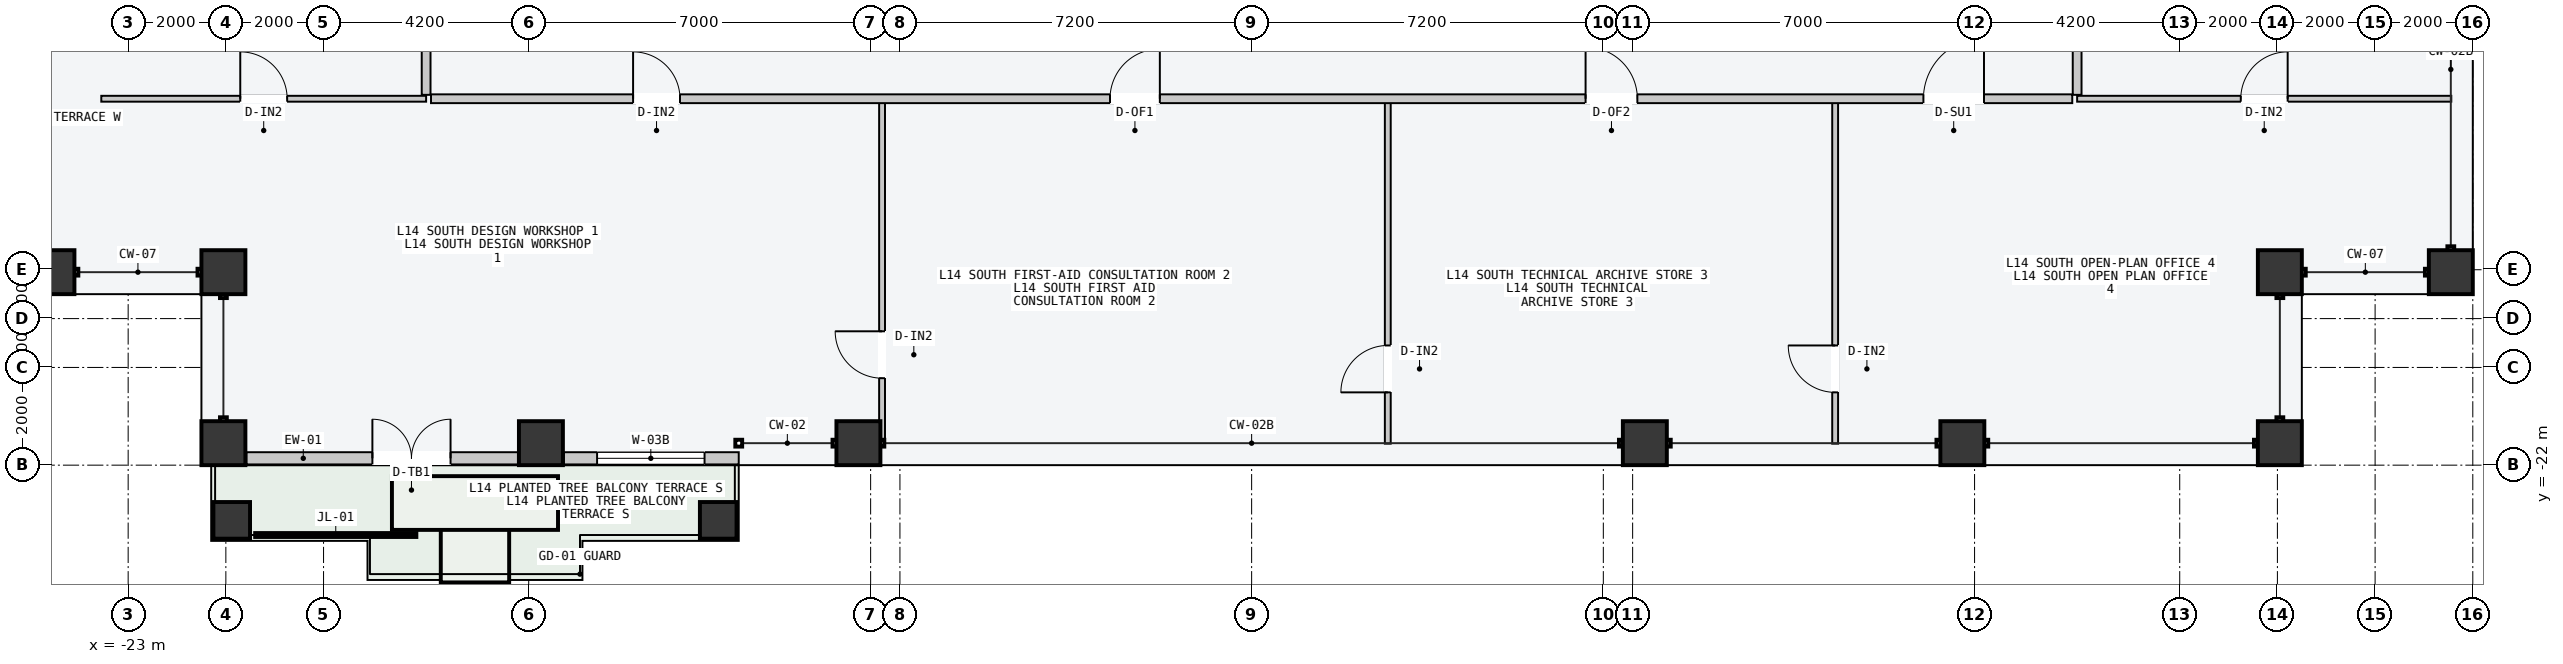
"""IFC4 building model, lengths in metres.
Left out: names, types, materials, properties, quantities, classifications, styles, units other than length and angle.
Written with IfcOpenShell. Run it as: python <this file> out.ifc"""

import sys

from ifc_helpers import new_model, si_unit, direction, frame, frame_2d, origin, origin_2d, place, context, subcontext, project, spatial, rectangle, hollow_rectangle, extrude, element, fill, save


model = new_model("IFC4")
c1 = context("Model", 3, precision=1e-05, world=origin(), true_north=direction((0.0, 1.0)))
c2 = subcontext(c1, "Body", "Model", "MODEL_VIEW")
j1 = project(units=[si_unit("LENGTHUNIT", "METRE"), si_unit("PLANEANGLEUNIT", "RADIAN")], contexts=[c1])
p1 = place(None, origin())
s1 = spatial("IfcSite", under=j1, at=p1, CompositionType="ELEMENT")
p2 = place(p1, origin())
s2 = spatial("IfcBuilding", under=s1, at=p2, CompositionType="ELEMENT")
p3 = place(p2, frame((0.0, 0.0, 56.4)))
s3 = spatial("IfcBuildingStorey", under=s2, at=p3, CompositionType="ELEMENT", Elevation=56.4)
for number, where, z_axis, x_axis in (
    (1, (-21.05, -21.55, 0.0), (0.0, 0.0, 1.0), (1.0, 0.0, 0.0)),
    (2, (-14.55, -21.55, 0.0), (0.0, 0.0, 1.0), (1.0, 0.0, 0.0)),
    (3, (-8.05, -21.55, 0.0), (0.0, 0.0, 1.0), (1.0, 0.0, 0.0)),
    (4, (8.05, -21.55, 0.0), (0.0, 0.0, 1.0), (1.0, 0.0, 0.0)),
    (5, (14.55, -21.55, 0.0), (0.0, 0.0, 1.0), (1.0, 0.0, 0.0)),
    (6, (21.05, -21.55, 0.0), (0.0, 0.0, 1.0), (1.0, 0.0, 0.0)),
    (7, (-24.55, -18.05, 0.0), (0.0, 0.0, 1.0), (0.0, 1.0, 0.0)),
    (8, (24.55, -18.05, 0.0), (0.0, 0.0, 1.0), (0.0, 1.0, 0.0)),
    (9, (21.05, -18.05, 0.0), (0.0, 0.0, 1.0), (1.0, 0.0, 0.0)),
    (10, (-21.05, -18.05, 0.0), (0.0, 0.0, 1.0), (1.0, 0.0, 0.0)),
):
    element("IfcColumn", number, at=place(p3, frame(where, z_axis=z_axis, x_axis=x_axis)), inside=s3, PredefinedType="COLUMN", context=c2, shape_type="SweptSolid", body=[
        extrude(hollow_rectangle(XDim=0.9, YDim=0.9, WallThickness=0.045, at=origin_2d()), origin(), (0.0, 0.0, 1.0), 3.6),
    ])
for number, where, z_axis, x_axis in (
    (11, (-20.88, -23.13, -0.2), (0.0, 0.0, 1.0), (1.0, 0.0, 0.0)),
    (12, (-10.92, -23.13, -0.2), (0.0, 0.0, 1.0), (1.0, 0.0, 0.0)),
):
    element("IfcColumn", number, at=place(p3, frame(where, z_axis=z_axis, x_axis=x_axis)), inside=s3, PredefinedType="COLUMN", context=c2, shape_type="SweptSolid", body=[
        extrude(hollow_rectangle(XDim=0.75, YDim=0.75, WallThickness=0.032, at=origin_2d()), origin(), (0.0, 0.0, 1.0), 3.8),
    ])
p4 = place(p3, frame((-20.58, -21.86, 0.0), z_axis=(0.0, 0.0, 1.0), x_axis=(1.0, 0.0, 0.0)))
e13 = element("IfcWall", 13, at=p4, inside=s3, PredefinedType="STANDARD", context=c2, shape_type="SweptSolid", body=[
    extrude(rectangle(XDim=5.56, YDim=0.25, at=frame_2d((2.78, 0.0))), origin(), (0.0, 0.0, 1.0), 3.4),
])
p5 = place(p4, frame((2.58, 0.0, 0.0)))
e14 = element("IfcOpeningElement", 14, at=p5, cuts=e13, PredefinedType="OPENING", context=c2, shape_type="SweptSolid", body=[
    extrude(rectangle(XDim=1.6, YDim=2.2, at=frame_2d((0.8, 1.1))), frame((0.0, 0.135, 0.0), z_axis=(0.0, -1.0, 0.0), x_axis=(1.0, 0.0, 0.0)), (0.0, 0.0, 1.0), 0.27),
])
p6 = place(p3, frame((-14.08, -21.86, 0.0), z_axis=(0.0, 0.0, 1.0), x_axis=(1.0, 0.0, 0.0)))
e15 = element("IfcWall", 15, at=p6, inside=s3, PredefinedType="STANDARD", context=c2, shape_type="SweptSolid", body=[
    extrude(rectangle(XDim=3.58, YDim=0.25, at=frame_2d((1.79, 0.0))), origin(), (0.0, 0.0, 1.0), 3.4),
])
p7 = place(p6, frame((0.68, 0.0, 0.85)))
e16 = element("IfcOpeningElement", 16, at=p7, cuts=e15, PredefinedType="OPENING", context=c2, shape_type="SweptSolid", body=[
    extrude(rectangle(XDim=2.2, YDim=2.1, at=frame_2d((1.1, 1.05))), frame((0.0, 0.135, 0.0), z_axis=(0.0, -1.0, 0.0), x_axis=(1.0, 0.0, 0.0)), (0.0, 0.0, 1.0), 0.27),
])
p8 = place(p3, frame((-7.566, -21.56, 0.0), z_axis=(0.0, 0.0, 1.0), x_axis=(0.0, 1.0, 0.0)))
e17 = element("IfcWall", 17, at=p8, inside=s3, PredefinedType="PARTITIONING", context=c2, shape_type="SweptSolid", body=[
    extrude(rectangle(XDim=7.0, YDim=0.12, at=frame_2d((3.5, 0.0))), origin(), (0.0, 0.0, 1.0), 3.4),
])
p9 = place(p8, frame((1.34, 0.0, 0.0)))
e18 = element("IfcOpeningElement", 18, at=p9, cuts=e17, PredefinedType="OPENING", context=c2, shape_type="SweptSolid", body=[
    extrude(rectangle(XDim=0.96, YDim=2.18, at=frame_2d((0.48, 1.09))), frame((0.0, 0.07, 0.0), z_axis=(0.0, -1.0, 0.0), x_axis=(1.0, 0.0, 0.0)), (0.0, 0.0, 1.0), 0.14),
])
p10 = place(p3, frame((2.787, -21.56, 0.0), z_axis=(0.0, 0.0, 1.0), x_axis=(0.0, 1.0, 0.0)))
e19 = element("IfcWall", 19, at=p10, inside=s3, PredefinedType="PARTITIONING", context=c2, shape_type="SweptSolid", body=[
    extrude(rectangle(XDim=7.0, YDim=0.12, at=frame_2d((3.5, 0.0))), origin(), (0.0, 0.0, 1.0), 3.4),
])
p11 = place(p10, frame((1.05, 0.0, 0.0)))
e20 = element("IfcOpeningElement", 20, at=p11, cuts=e19, PredefinedType="OPENING", context=c2, shape_type="SweptSolid", body=[
    extrude(rectangle(XDim=0.96, YDim=2.18, at=frame_2d((0.48, 1.09))), frame((0.0, 0.07, 0.0), z_axis=(0.0, -1.0, 0.0), x_axis=(1.0, 0.0, 0.0)), (0.0, 0.0, 1.0), 0.14),
])
p12 = place(p3, frame((11.946, -21.56, 0.0), z_axis=(0.0, 0.0, 1.0), x_axis=(0.0, 1.0, 0.0)))
e21 = element("IfcWall", 21, at=p12, inside=s3, PredefinedType="PARTITIONING", context=c2, shape_type="SweptSolid", body=[
    extrude(rectangle(XDim=7.0, YDim=0.12, at=frame_2d((3.5, 0.0))), origin(), (0.0, 0.0, 1.0), 3.4),
])
p13 = place(p12, frame((1.05, 0.0, 0.0)))
e22 = element("IfcOpeningElement", 22, at=p13, cuts=e21, PredefinedType="OPENING", context=c2, shape_type="SweptSolid", body=[
    extrude(rectangle(XDim=0.96, YDim=2.18, at=frame_2d((0.48, 1.09))), frame((0.0, 0.07, 0.0), z_axis=(0.0, -1.0, 0.0), x_axis=(1.0, 0.0, 0.0)), (0.0, 0.0, 1.0), 0.14),
])
p14 = place(p3, frame((-16.8, -14.5, 0.0), z_axis=(0.0, 0.0, 1.0), x_axis=(1.0, 0.0, 0.0)))
e23 = element("IfcWall", 23, at=p14, inside=s3, PredefinedType="PARTITIONING", context=c2, shape_type="SweptSolid", body=[
    extrude(rectangle(XDim=33.6, YDim=0.18, at=frame_2d((16.8, 0.0))), origin(), (0.0, 0.0, 1.0), 3.4),
])
p15 = place(p14, frame((4.137, 0.0, 0.0)))
e24 = element("IfcOpeningElement", 24, at=p15, cuts=e23, PredefinedType="OPENING", context=c2, shape_type="SweptSolid", body=[
    extrude(rectangle(XDim=0.96, YDim=2.18, at=frame_2d((0.48, 1.09))), frame((0.0, 0.1, 0.0), z_axis=(0.0, -1.0, 0.0), x_axis=(1.0, 0.0, 0.0)), (0.0, 0.0, 1.0), 0.2),
])
p16 = place(p14, frame((13.901, 0.0, 0.0)))
e25 = element("IfcOpeningElement", 25, at=p16, cuts=e23, PredefinedType="OPENING", context=c2, shape_type="SweptSolid", body=[
    extrude(rectangle(XDim=1.02, YDim=2.2, at=frame_2d((0.51, 1.1))), frame((0.0, 0.1, 0.0), z_axis=(0.0, -1.0, 0.0), x_axis=(1.0, 0.0, 0.0)), (0.0, 0.0, 1.0), 0.2),
])
p17 = place(p14, frame((23.637, 0.0, 0.0)))
e26 = element("IfcOpeningElement", 26, at=p17, cuts=e23, PredefinedType="OPENING", context=c2, shape_type="SweptSolid", body=[
    extrude(rectangle(XDim=1.06, YDim=2.2, at=frame_2d((0.53, 1.1))), frame((0.0, 0.1, 0.0), z_axis=(0.0, -1.0, 0.0), x_axis=(1.0, 0.0, 0.0)), (0.0, 0.0, 1.0), 0.2),
])
p18 = place(p14, frame((30.553, 0.0, 0.0)))
e27 = element("IfcOpeningElement", 27, at=p18, cuts=e23, PredefinedType="OPENING", context=c2, shape_type="SweptSolid", body=[
    extrude(rectangle(XDim=1.24, YDim=2.24, at=frame_2d((0.62, 1.12))), frame((0.0, 0.1, 0.0), z_axis=(0.0, -1.0, 0.0), x_axis=(1.0, 0.0, 0.0)), (0.0, 0.0, 1.0), 0.2),
])
p19 = place(p3, frame((-23.55, -14.5, 0.0), z_axis=(0.0, 0.0, 1.0), x_axis=(1.0, 0.0, 0.0)))
e28 = element("IfcWall", 28, at=p19, inside=s3, PredefinedType="PARTITIONING", context=c2, shape_type="SweptSolid", body=[
    extrude(rectangle(XDim=6.65, YDim=0.12, at=frame_2d((3.325, 0.0))), origin(), (0.0, 0.0, 1.0), 3.4),
])
p20 = place(p19, frame((2.845, 0.0, 0.0)))
e29 = element("IfcOpeningElement", 29, at=p20, cuts=e28, PredefinedType="OPENING", context=c2, shape_type="SweptSolid", body=[
    extrude(rectangle(XDim=0.96, YDim=2.18, at=frame_2d((0.48, 1.09))), frame((0.0, 0.07, 0.0), z_axis=(0.0, -1.0, 0.0), x_axis=(1.0, 0.0, 0.0)), (0.0, 0.0, 1.0), 0.14),
])
p21 = place(p3, frame((16.9, -14.5, 0.0), z_axis=(0.0, 0.0, 1.0), x_axis=(1.0, 0.0, 0.0)))
e30 = element("IfcWall", 30, at=p21, inside=s3, PredefinedType="PARTITIONING", context=c2, shape_type="SweptSolid", body=[
    extrude(rectangle(XDim=7.66, YDim=0.12, at=frame_2d((3.83, 0.0))), origin(), (0.0, 0.0, 1.0), 3.4),
])
p22 = place(p21, frame((3.35, 0.0, 0.0)))
e31 = element("IfcOpeningElement", 31, at=p22, cuts=e30, PredefinedType="OPENING", context=c2, shape_type="SweptSolid", body=[
    extrude(rectangle(XDim=0.96, YDim=2.18, at=frame_2d((0.48, 1.09))), frame((0.0, 0.07, 0.0), z_axis=(0.0, -1.0, 0.0), x_axis=(1.0, 0.0, 0.0)), (0.0, 0.0, 1.0), 0.14),
])
p23 = place(p3, frame((-16.9, -14.42, 0.0), z_axis=(0.0, 0.0, 1.0), x_axis=(0.0, 1.0, 0.0)))
e32 = element("IfcWall", 32, at=p23, inside=s3, PredefinedType="PARTITIONING", context=c2, shape_type="SweptSolid", body=[
    extrude(rectangle(XDim=26.54, YDim=0.18, at=frame_2d((13.27, 0.0))), origin(), (0.0, 0.0, 1.0), 3.4),
])
p24 = place(p23, frame((4.873, 0.0, 0.0)))
e33 = element("IfcOpeningElement", 33, at=p24, cuts=e32, PredefinedType="OPENING", context=c2, shape_type="SweptSolid", body=[
    extrude(rectangle(XDim=1.4, YDim=2.2, at=frame_2d((0.7, 1.1))), frame((0.0, 0.1, 0.0), z_axis=(0.0, -1.0, 0.0), x_axis=(1.0, 0.0, 0.0)), (0.0, 0.0, 1.0), 0.2),
])
p25 = place(p23, frame((18.393, 0.0, 0.0)))
e34 = element("IfcOpeningElement", 34, at=p25, cuts=e32, PredefinedType="OPENING", context=c2, shape_type="SweptSolid", body=[
    extrude(rectangle(XDim=0.9, YDim=2.15, at=frame_2d((0.45, 1.075))), frame((0.0, 0.1, 0.0), z_axis=(0.0, -1.0, 0.0), x_axis=(1.0, 0.0, 0.0)), (0.0, 0.0, 1.0), 0.2),
])
p26 = place(p3, frame((16.9, -14.42, 0.0), z_axis=(0.0, 0.0, 1.0), x_axis=(0.0, 1.0, 0.0)))
e35 = element("IfcWall", 35, at=p26, inside=s3, PredefinedType="PARTITIONING", context=c2, shape_type="SweptSolid", body=[
    extrude(rectangle(XDim=26.54, YDim=0.18, at=frame_2d((13.27, 0.0))), origin(), (0.0, 0.0, 1.0), 3.4),
])
p27 = place(p26, frame((2.352, 0.0, 0.0)))
e36 = element("IfcOpeningElement", 36, at=p27, cuts=e35, PredefinedType="OPENING", context=c2, shape_type="SweptSolid", body=[
    extrude(rectangle(XDim=1.4, YDim=2.2, at=frame_2d((0.7, 1.1))), frame((0.0, 0.1, 0.0), z_axis=(0.0, -1.0, 0.0), x_axis=(1.0, 0.0, 0.0)), (0.0, 0.0, 1.0), 0.2),
])
p28 = place(p26, frame((10.166, 0.0, 0.0)))
e37 = element("IfcOpeningElement", 37, at=p28, cuts=e35, PredefinedType="OPENING", context=c2, shape_type="SweptSolid", body=[
    extrude(rectangle(XDim=0.9, YDim=2.15, at=frame_2d((0.45, 1.075))), frame((0.0, 0.1, 0.0), z_axis=(0.0, -1.0, 0.0), x_axis=(1.0, 0.0, 0.0)), (0.0, 0.0, 1.0), 0.2),
])
p29 = place(p26, frame((20.354, 0.0, 0.0)))
e38 = element("IfcOpeningElement", 38, at=p29, cuts=e35, PredefinedType="OPENING", context=c2, shape_type="SweptSolid", body=[
    extrude(rectangle(XDim=0.96, YDim=2.18, at=frame_2d((0.48, 1.09))), frame((0.0, 0.1, 0.0), z_axis=(0.0, -1.0, 0.0), x_axis=(1.0, 0.0, 0.0)), (0.0, 0.0, 1.0), 0.2),
])
p30 = place(p5, origin())
e39 = element("IfcDoor", 39, at=p30, inside=s3, OperationType="DOUBLE_DOOR_SINGLE_SWING", PredefinedType="DOOR", context=c2, shape_type="SweptSolid", body=[
    extrude(rectangle(XDim=1.6, YDim=2.2, at=frame_2d((0.8, 1.1))), frame((0.0, 0.025, 0.0), z_axis=(0.0, -1.0, 0.0), x_axis=(1.0, 0.0, 0.0)), (0.0, 0.0, 1.0), 0.05),
])
fill(e14, e39)
p31 = place(p7, origin())
e40 = element("IfcWindow", 40, at=p31, inside=s3, PartitioningType="SINGLE_PANEL", PredefinedType="WINDOW", context=c2, shape_type="SweptSolid", body=[
    extrude(rectangle(XDim=2.2, YDim=2.1, at=frame_2d((1.1, 1.05))), frame((0.0, 0.03, 0.0), z_axis=(0.0, -1.0, 0.0), x_axis=(1.0, 0.0, 0.0)), (0.0, 0.0, 1.0), 0.06),
])
fill(e16, e40)
p32 = place(p9, origin())
e41 = element("IfcDoor", 41, at=p32, inside=s3, OperationType="SINGLE_SWING_RIGHT", PredefinedType="DOOR", context=c2, shape_type="SweptSolid", body=[
    extrude(rectangle(XDim=0.96, YDim=2.18, at=frame_2d((0.48, 1.09))), frame((0.0, 0.025, 0.0), z_axis=(0.0, -1.0, 0.0), x_axis=(1.0, 0.0, 0.0)), (0.0, 0.0, 1.0), 0.05),
])
fill(e18, e41)
p33 = place(p11, origin())
e42 = element("IfcDoor", 42, at=p33, inside=s3, OperationType="SINGLE_SWING_LEFT", PredefinedType="DOOR", context=c2, shape_type="SweptSolid", body=[
    extrude(rectangle(XDim=0.96, YDim=2.18, at=frame_2d((0.48, 1.09))), frame((0.0, 0.025, 0.0), z_axis=(0.0, -1.0, 0.0), x_axis=(1.0, 0.0, 0.0)), (0.0, 0.0, 1.0), 0.05),
])
fill(e20, e42)
p34 = place(p13, origin())
e43 = element("IfcDoor", 43, at=p34, inside=s3, OperationType="SINGLE_SWING_RIGHT", PredefinedType="DOOR", context=c2, shape_type="SweptSolid", body=[
    extrude(rectangle(XDim=0.96, YDim=2.18, at=frame_2d((0.48, 1.09))), frame((0.0, 0.025, 0.0), z_axis=(0.0, -1.0, 0.0), x_axis=(1.0, 0.0, 0.0)), (0.0, 0.0, 1.0), 0.05),
])
fill(e22, e43)
p35 = place(p15, origin())
e44 = element("IfcDoor", 44, at=p35, inside=s3, OperationType="SINGLE_SWING_LEFT", PredefinedType="DOOR", context=c2, shape_type="SweptSolid", body=[
    extrude(rectangle(XDim=0.96, YDim=2.18, at=frame_2d((0.48, 1.09))), frame((0.0, 0.025, 0.0), z_axis=(0.0, -1.0, 0.0), x_axis=(1.0, 0.0, 0.0)), (0.0, 0.0, 1.0), 0.05),
])
fill(e24, e44)
p36 = place(p16, origin())
e45 = element("IfcDoor", 45, at=p36, inside=s3, OperationType="SINGLE_SWING_RIGHT", PredefinedType="DOOR", context=c2, shape_type="SweptSolid", body=[
    extrude(rectangle(XDim=1.02, YDim=2.2, at=frame_2d((0.51, 1.1))), frame((0.0, 0.025, 0.0), z_axis=(0.0, -1.0, 0.0), x_axis=(1.0, 0.0, 0.0)), (0.0, 0.0, 1.0), 0.05),
])
fill(e25, e45)
p37 = place(p17, origin())
e46 = element("IfcDoor", 46, at=p37, inside=s3, OperationType="SINGLE_SWING_LEFT", PredefinedType="DOOR", context=c2, shape_type="SweptSolid", body=[
    extrude(rectangle(XDim=1.06, YDim=2.2, at=frame_2d((0.53, 1.1))), frame((0.0, 0.025, 0.0), z_axis=(0.0, -1.0, 0.0), x_axis=(1.0, 0.0, 0.0)), (0.0, 0.0, 1.0), 0.05),
])
fill(e26, e46)
p38 = place(p18, origin())
e47 = element("IfcDoor", 47, at=p38, inside=s3, OperationType="SINGLE_SWING_RIGHT", PredefinedType="DOOR", context=c2, shape_type="SweptSolid", body=[
    extrude(rectangle(XDim=1.24, YDim=2.24, at=frame_2d((0.62, 1.12))), frame((0.0, 0.025, 0.0), z_axis=(0.0, -1.0, 0.0), x_axis=(1.0, 0.0, 0.0)), (0.0, 0.0, 1.0), 0.05),
])
fill(e27, e47)
p39 = place(p20, origin())
e48 = element("IfcDoor", 48, at=p39, inside=s3, OperationType="SINGLE_SWING_LEFT", PredefinedType="DOOR", context=c2, shape_type="SweptSolid", body=[
    extrude(rectangle(XDim=0.96, YDim=2.18, at=frame_2d((0.48, 1.09))), frame((0.0, 0.025, 0.0), z_axis=(0.0, -1.0, 0.0), x_axis=(1.0, 0.0, 0.0)), (0.0, 0.0, 1.0), 0.05),
])
fill(e29, e48)
p40 = place(p22, origin())
e49 = element("IfcDoor", 49, at=p40, inside=s3, OperationType="SINGLE_SWING_RIGHT", PredefinedType="DOOR", context=c2, shape_type="SweptSolid", body=[
    extrude(rectangle(XDim=0.96, YDim=2.18, at=frame_2d((0.48, 1.09))), frame((0.0, 0.025, 0.0), z_axis=(0.0, -1.0, 0.0), x_axis=(1.0, 0.0, 0.0)), (0.0, 0.0, 1.0), 0.05),
])
fill(e31, e49)
save(model, sys.argv[1])
